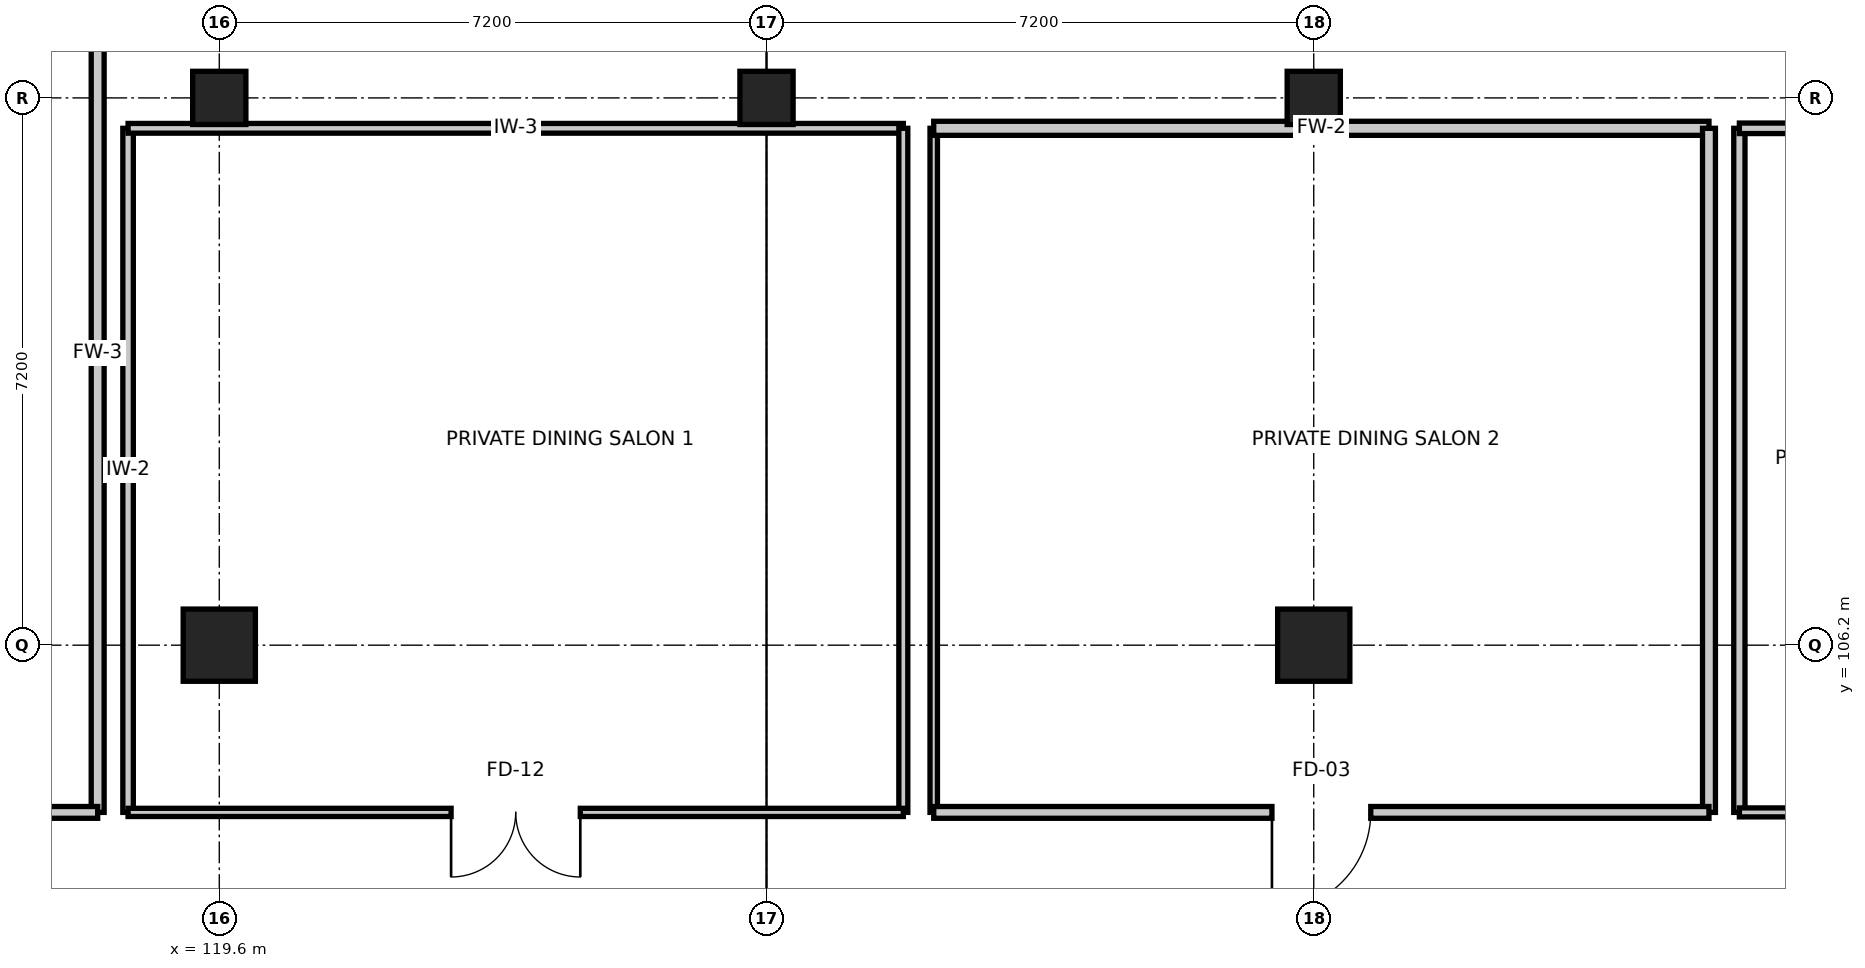
"""IFC4 building model, lengths in metres.
Left out: names, types, materials, properties, quantities, classifications, styles, units other than length and angle.
Written with IfcOpenShell. Run it as: python <this file> out.ifc"""

import sys

from ifc_helpers import new_model, si_unit, direction, frame, frame_2d, origin, origin_2d, place, context, subcontext, project, spatial, rectangle, extrude, element, fill, save


model = new_model("IFC4")
c1 = context("Model", 3, precision=1e-05, world=origin(), true_north=direction((0.0, 1.0)))
c2 = subcontext(c1, "Body", "Model", "MODEL_VIEW")
j1 = project(units=[si_unit("LENGTHUNIT", "METRE"), si_unit("PLANEANGLEUNIT", "RADIAN")], contexts=[c1])
p1 = place(None, origin())
s1 = spatial("IfcSite", under=j1, at=p1, CompositionType="ELEMENT")
p2 = place(p1, origin())
s2 = spatial("IfcBuilding", under=s1, at=p2, CompositionType="ELEMENT")
p3 = place(p2, frame((0.0, 0.0, 5.4)))
s3 = spatial("IfcBuildingStorey", under=s2, at=p3, CompositionType="ELEMENT", Elevation=5.4)
p4 = place(p3, frame((119.6, 106.2, 0.0), z_axis=(0.0, 0.0, 1.0), x_axis=(1.0, 0.0, 0.0)))
e1 = element("IfcColumn", 1, at=p4, inside=s3, PredefinedType="COLUMN", context=c2, shape_type="SweptSolid", body=[
    extrude(rectangle(XDim=0.95, YDim=0.95, at=origin_2d()), origin(), (0.0, 0.0, 1.0), 5.1),
])
for number, where, z_axis, x_axis in (
    (2, (119.6, 113.4, 0.0), (0.0, 0.0, 1.0), (1.0, 0.0, 0.0)),
    (3, (126.8, 113.4, 0.0), (0.0, 0.0, 1.0), (1.0, 0.0, 0.0)),
):
    element("IfcColumn", number, at=place(p3, frame(where, z_axis=z_axis, x_axis=x_axis)), inside=s3, PredefinedType="COLUMN", context=c2, shape_type="SweptSolid", body=[
        extrude(rectangle(XDim=0.7, YDim=0.7, at=origin_2d()), origin(), (0.0, 0.0, 1.0), 5.1),
    ])
p5 = place(p3, frame((134.0, 106.2, 0.0), z_axis=(0.0, 0.0, 1.0), x_axis=(1.0, 0.0, 0.0)))
e4 = element("IfcColumn", 4, at=p5, inside=s3, PredefinedType="COLUMN", context=c2, shape_type="SweptSolid", body=[
    extrude(rectangle(XDim=0.95, YDim=0.95, at=origin_2d()), origin(), (0.0, 0.0, 1.0), 5.1),
])
p6 = place(p3, frame((134.0, 113.4, 0.0), z_axis=(0.0, 0.0, 1.0), x_axis=(1.0, 0.0, 0.0)))
e5 = element("IfcColumn", 5, at=p6, inside=s3, PredefinedType="COLUMN", context=c2, shape_type="SweptSolid", body=[
    extrude(rectangle(XDim=0.7, YDim=0.7, at=origin_2d()), origin(), (0.0, 0.0, 1.0), 5.1),
])
p7 = place(p3, frame((118.0, 116.078, 0.0), z_axis=(0.0, 0.0, 1.0), x_axis=(0.0, -1.0, 0.0)))
e6 = element("IfcWall", 6, at=p7, inside=s3, PredefinedType="PARTITIONING", context=c2, shape_type="SweptSolid", body=[
    extrude(rectangle(XDim=12.078, YDim=0.17, at=frame_2d((6.039, 0.0))), origin(), (0.0, 0.0, 1.0), 3.445),
])
p8 = place(p3, frame((118.0, 104.0, 0.0), z_axis=(0.0, 0.0, 1.0), x_axis=(-1.0, 0.0, 0.0)))
e7 = element("IfcWall", 7, at=p8, inside=s3, PredefinedType="PARTITIONING", context=c2, shape_type="SweptSolid", body=[
    extrude(rectangle(XDim=48.4, YDim=0.155, at=frame_2d((24.2, 0.0))), origin(), (0.0, 0.0, 1.0), 4.115),
])
p9 = place(p8, frame((23.475, 0.0, 0.0)))
e8 = element("IfcOpeningElement", 8, at=p9, cuts=e7, PredefinedType="OPENING", context=c2, shape_type="SweptSolid", body=[
    extrude(rectangle(XDim=1.45, YDim=2.2, at=frame_2d((0.725, 1.1))), frame((0.0, 0.087, 0.0), z_axis=(0.0, -1.0, 0.0), x_axis=(1.0, 0.0, 0.0)), (0.0, 0.0, 1.0), 0.175),
])
p10 = place(p3, frame((118.4, 104.0, 0.0), z_axis=(0.0, 0.0, 1.0), x_axis=(0.0, 1.0, 0.0)))
e9 = element("IfcWall", 9, at=p10, inside=s3, PredefinedType="PARTITIONING", context=c2, shape_type="SweptSolid", body=[
    extrude(rectangle(XDim=9.0, YDim=0.138, at=frame_2d((4.5, 0.0))), origin(), (0.0, 0.0, 1.0), 3.445),
])
p11 = place(p3, frame((118.4, 113.0, 0.0), z_axis=(0.0, 0.0, 1.0), x_axis=(1.0, 0.0, 0.0)))
e10 = element("IfcWall", 10, at=p11, inside=s3, PredefinedType="PARTITIONING", context=c2, shape_type="SweptSolid", body=[
    extrude(rectangle(XDim=10.2, YDim=0.128, at=frame_2d((5.1, 0.0))), origin(), (0.0, 0.0, 1.0), 4.115),
])
p12 = place(p3, frame((128.6, 113.0, 0.0), z_axis=(0.0, 0.0, 1.0), x_axis=(0.0, -1.0, 0.0)))
e11 = element("IfcWall", 11, at=p12, inside=s3, PredefinedType="PARTITIONING", context=c2, shape_type="SweptSolid", body=[
    extrude(rectangle(XDim=9.0, YDim=0.118, at=frame_2d((4.5, 0.0))), origin(), (0.0, 0.0, 1.0), 3.445),
])
p13 = place(p3, frame((128.6, 104.0, 0.0), z_axis=(0.0, 0.0, 1.0), x_axis=(-1.0, 0.0, 0.0)))
e12 = element("IfcWall", 12, at=p13, inside=s3, PredefinedType="PARTITIONING", context=c2, shape_type="SweptSolid", body=[
    extrude(rectangle(XDim=10.2, YDim=0.108, at=frame_2d((5.1, 0.0))), origin(), (0.0, 0.0, 1.0), 4.115),
])
p14 = place(p13, frame((4.25, 0.0, 0.0)))
e13 = element("IfcOpeningElement", 13, at=p14, cuts=e12, PredefinedType="OPENING", context=c2, shape_type="SweptSolid", body=[
    extrude(rectangle(XDim=1.7, YDim=2.25, at=frame_2d((0.85, 1.125))), frame((0.0, 0.064, 0.0), z_axis=(0.0, -1.0, 0.0), x_axis=(1.0, 0.0, 0.0)), (0.0, 0.0, 1.0), 0.128),
])
p15 = place(p3, frame((129.0, 104.0, 0.0), z_axis=(0.0, 0.0, 1.0), x_axis=(0.0, 1.0, 0.0)))
e14 = element("IfcWall", 14, at=p15, inside=s3, PredefinedType="PARTITIONING", context=c2, shape_type="SweptSolid", body=[
    extrude(rectangle(XDim=9.0, YDim=0.098, at=frame_2d((4.5, 0.0))), origin(), (0.0, 0.0, 1.0), 3.445),
])
p16 = place(p3, frame((129.0, 113.0, 0.0), z_axis=(0.0, 0.0, 1.0), x_axis=(1.0, 0.0, 0.0)))
e15 = element("IfcWall", 15, at=p16, inside=s3, PredefinedType="PARTITIONING", context=c2, shape_type="SweptSolid", body=[
    extrude(rectangle(XDim=10.2, YDim=0.185, at=frame_2d((5.1, 0.0))), origin(), (0.0, 0.0, 1.0), 4.115),
])
p17 = place(p3, frame((139.2, 113.0, 0.0), z_axis=(0.0, 0.0, 1.0), x_axis=(0.0, -1.0, 0.0)))
e16 = element("IfcWall", 16, at=p17, inside=s3, PredefinedType="PARTITIONING", context=c2, shape_type="SweptSolid", body=[
    extrude(rectangle(XDim=9.0, YDim=0.17, at=frame_2d((4.5, 0.0))), origin(), (0.0, 0.0, 1.0), 3.365),
])
p18 = place(p3, frame((139.2, 104.0, 0.0), z_axis=(0.0, 0.0, 1.0), x_axis=(-1.0, 0.0, 0.0)))
e17 = element("IfcWall", 17, at=p18, inside=s3, PredefinedType="PARTITIONING", context=c2, shape_type="SweptSolid", body=[
    extrude(rectangle(XDim=10.2, YDim=0.155, at=frame_2d((5.1, 0.0))), origin(), (0.0, 0.0, 1.0), 4.115),
])
p19 = place(p18, frame((4.45, 0.0, 0.0)))
e18 = element("IfcOpeningElement", 18, at=p19, cuts=e17, PredefinedType="OPENING", context=c2, shape_type="SweptSolid", body=[
    extrude(rectangle(XDim=1.3, YDim=2.15, at=frame_2d((0.65, 1.075))), frame((0.0, 0.087, 0.0), z_axis=(0.0, -1.0, 0.0), x_axis=(1.0, 0.0, 0.0)), (0.0, 0.0, 1.0), 0.175),
])
p20 = place(p3, frame((139.6, 104.0, 0.0), z_axis=(0.0, 0.0, 1.0), x_axis=(0.0, 1.0, 0.0)))
e19 = element("IfcWall", 19, at=p20, inside=s3, PredefinedType="PARTITIONING", context=c2, shape_type="SweptSolid", body=[
    extrude(rectangle(XDim=9.0, YDim=0.148, at=frame_2d((4.5, 0.0))), origin(), (0.0, 0.0, 1.0), 3.365),
])
p21 = place(p3, frame((139.6, 113.0, 0.0), z_axis=(0.0, 0.0, 1.0), x_axis=(1.0, 0.0, 0.0)))
e20 = element("IfcWall", 20, at=p21, inside=s3, PredefinedType="PARTITIONING", context=c2, shape_type="SweptSolid", body=[
    extrude(rectangle(XDim=10.2, YDim=0.138, at=frame_2d((5.1, 0.0))), origin(), (0.0, 0.0, 1.0), 4.115),
])
p22 = place(p3, frame((149.8, 104.0, 0.0), z_axis=(0.0, 0.0, 1.0), x_axis=(-1.0, 0.0, 0.0)))
e21 = element("IfcWall", 21, at=p22, inside=s3, PredefinedType="PARTITIONING", context=c2, shape_type="SweptSolid", body=[
    extrude(rectangle(XDim=10.2, YDim=0.118, at=frame_2d((5.1, 0.0))), origin(), (0.0, 0.0, 1.0), 4.115),
])
p23 = place(p22, frame((4.3, 0.0, 0.0)))
e22 = element("IfcOpeningElement", 22, at=p23, cuts=e21, PredefinedType="OPENING", context=c2, shape_type="SweptSolid", body=[
    extrude(rectangle(XDim=1.6, YDim=2.15, at=frame_2d((0.8, 1.075))), frame((0.0, 0.069, 0.0), z_axis=(0.0, -1.0, 0.0), x_axis=(1.0, 0.0, 0.0)), (0.0, 0.0, 1.0), 0.138),
])
p24 = place(p14, origin())
e23 = element("IfcDoor", 23, at=p24, inside=s3, OperationType="DOUBLE_DOOR_SINGLE_SWING", PredefinedType="DOOR", context=c2, shape_type="SweptSolid", body=[
    extrude(rectangle(XDim=1.7, YDim=2.25, at=frame_2d((0.85, 1.125))), frame((0.0, 0.025, 0.0), z_axis=(0.0, -1.0, 0.0), x_axis=(1.0, 0.0, 0.0)), (0.0, 0.0, 1.0), 0.05),
])
fill(e13, e23)
p25 = place(p19, origin())
e24 = element("IfcDoor", 24, at=p25, inside=s3, OperationType="SINGLE_SWING_RIGHT", PredefinedType="DOOR", context=c2, shape_type="SweptSolid", body=[
    extrude(rectangle(XDim=1.3, YDim=2.15, at=frame_2d((0.65, 1.075))), frame((0.0, 0.025, 0.0), z_axis=(0.0, -1.0, 0.0), x_axis=(1.0, 0.0, 0.0)), (0.0, 0.0, 1.0), 0.05),
])
fill(e18, e24)
save(model, sys.argv[1])
